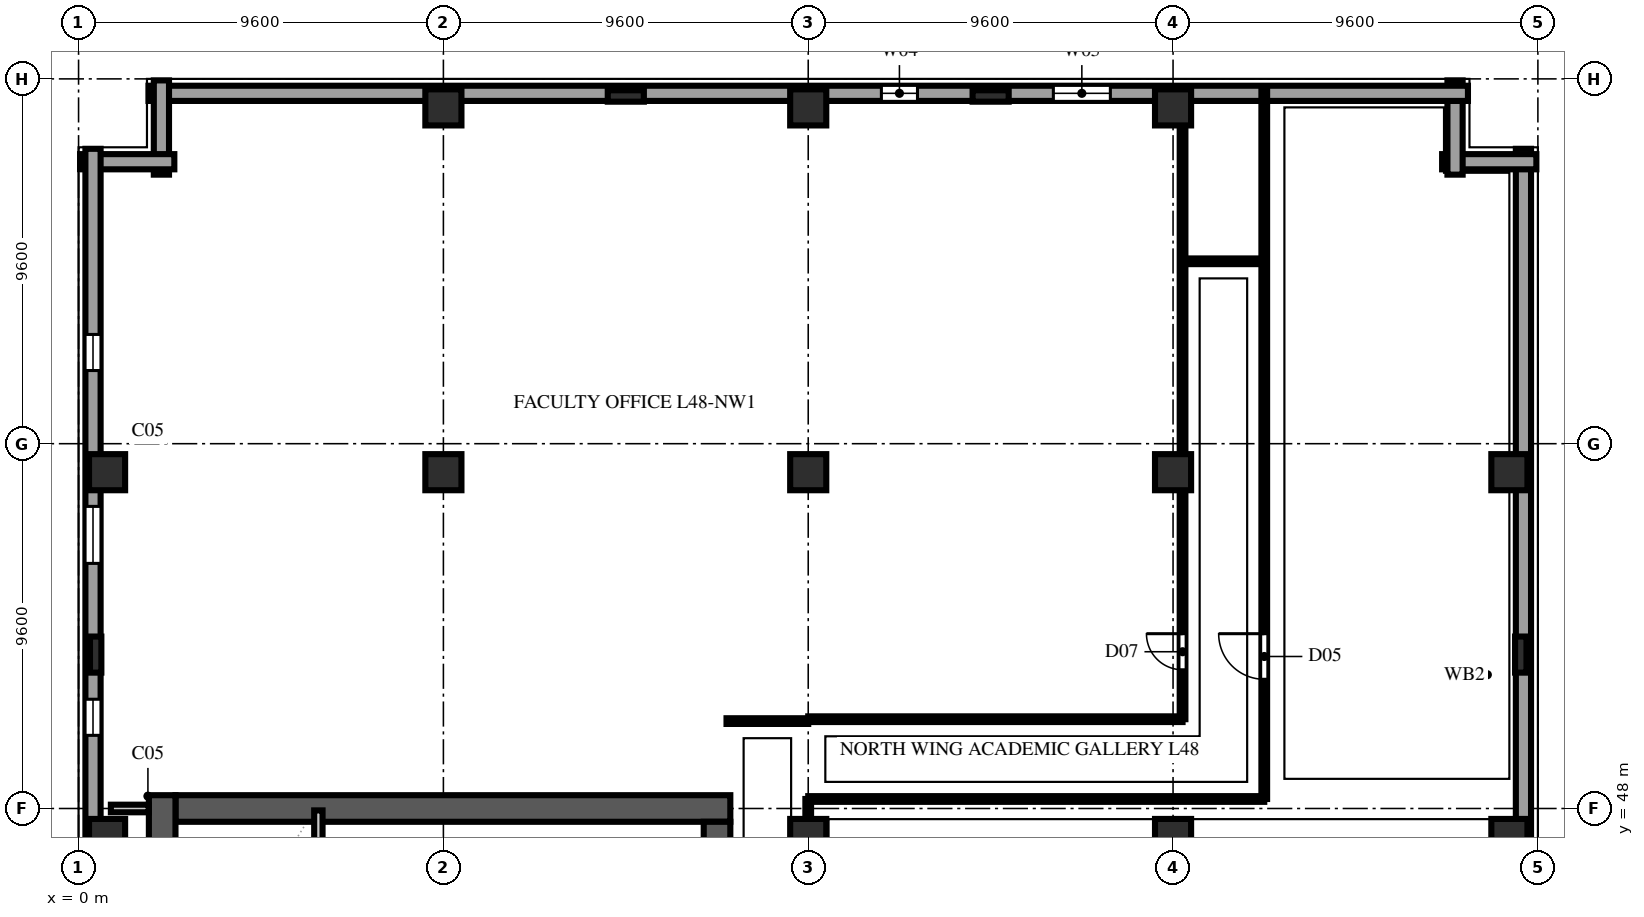
"""IFC4 building model, lengths in metres.
Left out: names, types, materials, properties, quantities, classifications, styles, units other than length and angle.
Written with IfcOpenShell. Run it as: python <this file> out.ifc"""

import sys

from ifc_helpers import new_model, si_unit, direction, frame, frame_2d, origin, origin_2d, place, context, subcontext, project, spatial, rectangle, extrude, element, fill, save


model = new_model("IFC4")
c1 = context("Model", 3, precision=1e-05, world=origin(), true_north=direction((0.0, 1.0)))
c2 = subcontext(c1, "Body", "Model", "MODEL_VIEW")
j1 = project(units=[si_unit("LENGTHUNIT", "METRE"), si_unit("PLANEANGLEUNIT", "RADIAN")], contexts=[c1])
p1 = place(None, origin())
s1 = spatial("IfcSite", under=j1, at=p1, CompositionType="ELEMENT")
p2 = place(p1, origin())
s2 = spatial("IfcBuilding", under=s1, at=p2, CompositionType="ELEMENT")
p3 = place(p2, frame((0.0, 0.0, 190.2)))
s3 = spatial("IfcBuildingStorey", under=s2, at=p3, CompositionType="ELEMENT", Elevation=190.2)
p4 = place(p3, frame((2.55, 48.0, 0.0), z_axis=(0.0, 0.0, 1.0), x_axis=(1.0, 0.0, 0.0)))
e1 = element("IfcWall", 1, at=p4, inside=s3, PredefinedType="SHEAR", context=c2, shape_type="SweptSolid", body=[
    extrude(rectangle(XDim=14.6, YDim=0.7, at=frame_2d((7.3, 0.0))), origin(), (0.0, 0.0, 1.0), 3.48),
])
p5 = place(p3, frame((2.2, 9.25, 0.0), z_axis=(0.0, 0.0, 1.0), x_axis=(0.0, 1.0, 0.0)))
e2 = element("IfcWall", 2, at=p5, inside=s3, PredefinedType="SHEAR", context=c2, shape_type="SweptSolid", body=[
    extrude(rectangle(XDim=39.1, YDim=0.7, at=frame_2d((19.55, 0.0))), origin(), (0.0, 0.0, 1.0), 3.48),
])
p6 = place(p3, frame((16.8, 36.4, 0.0), z_axis=(0.0, 0.0, 1.0), x_axis=(0.0, 1.0, 0.0)))
e3 = element("IfcWall", 3, at=p6, inside=s3, PredefinedType="SHEAR", context=c2, shape_type="SweptSolid", body=[
    extrude(rectangle(XDim=11.25, YDim=0.7, at=frame_2d((5.625, 0.0))), origin(), (0.0, 0.0, 1.0), 3.48),
])
p7 = place(p6, frame((9.2, 0.0, 0.0)))
e4 = element("IfcOpeningElement", 4, at=p7, cuts=e3, PredefinedType="OPENING", context=c2, shape_type="SweptSolid", body=[
    extrude(rectangle(XDim=0.95, YDim=2.15, at=frame_2d((0.475, 1.075))), frame((0.0, 0.362, 0.0), z_axis=(0.0, -1.0, 0.0), x_axis=(1.0, 0.0, 0.0)), (0.0, 0.0, 1.0), 0.724),
])
for number, where, z_axis, x_axis in (
    (5, (0.75, 47.25, 0.0), (0.0, 0.0, 1.0), (1.0, 0.0, 0.0)),
    (6, (0.75, 56.85, 0.0), (0.0, 0.0, 1.0), (1.0, 0.0, 0.0)),
    (7, (9.6, 56.85, 0.0), (0.0, 0.0, 1.0), (1.0, 0.0, 0.0)),
    (8, (9.6, 66.45, 0.0), (0.0, 0.0, 1.0), (1.0, 0.0, 0.0)),
    (9, (19.2, 47.25, 0.0), (0.0, 0.0, 1.0), (1.0, 0.0, 0.0)),
    (10, (19.2, 56.85, 0.0), (0.0, 0.0, 1.0), (1.0, 0.0, 0.0)),
    (11, (19.2, 66.45, 0.0), (0.0, 0.0, 1.0), (1.0, 0.0, 0.0)),
    (12, (28.8, 47.25, 0.0), (0.0, 0.0, 1.0), (1.0, 0.0, 0.0)),
    (13, (28.8, 56.85, 0.0), (0.0, 0.0, 1.0), (1.0, 0.0, 0.0)),
    (14, (28.8, 66.45, 0.0), (0.0, 0.0, 1.0), (1.0, 0.0, 0.0)),
    (15, (37.65, 47.25, 0.0), (0.0, 0.0, 1.0), (1.0, 0.0, 0.0)),
    (16, (37.65, 56.85, 0.0), (0.0, 0.0, 1.0), (1.0, 0.0, 0.0)),
):
    element("IfcColumn", number, at=place(p3, frame(where, z_axis=z_axis, x_axis=x_axis)), inside=s3, PredefinedType="COLUMN", context=c2, shape_type="SweptSolid", body=[
        extrude(rectangle(XDim=0.95, YDim=0.95, at=origin_2d()), origin(), (0.0, 0.0, 1.0), 3.8),
    ])
for number, where, z_axis, x_axis in (
    (17, (0.45, 52.05, 0.0), (0.0, 0.0, 1.0), (0.0, 1.0, 0.0)),
    (18, (14.4, 66.75, 0.0), (0.0, 0.0, 1.0), (1.0, 0.0, 0.0)),
    (19, (24.0, 66.75, 0.0), (0.0, 0.0, 1.0), (1.0, 0.0, 0.0)),
    (20, (37.95, 52.05, 0.0), (0.0, 0.0, 1.0), (0.0, 1.0, 0.0)),
):
    element("IfcColumn", number, at=place(p3, frame(where, z_axis=z_axis, x_axis=x_axis)), inside=s3, PredefinedType="PILASTER", context=c2, shape_type="SweptSolid", body=[
        extrude(rectangle(XDim=0.95, YDim=0.3, at=origin_2d()), origin(), (0.0, 0.0, 1.0), 3.8),
    ])
p8 = place(p3, frame((38.02, 37.68, 0.0), z_axis=(0.0, 0.0, 1.0), x_axis=(0.0, 1.0, 0.0)))
e21 = element("IfcWall", 21, at=p8, inside=s3, PredefinedType="SOLIDWALL", context=c2, shape_type="SweptSolid", body=[
    extrude(rectangle(XDim=27.68, YDim=0.4, at=frame_2d((13.84, 0.0))), origin(), (0.0, 0.0, 1.0), 3.48),
])
p9 = place(p3, frame((38.36, 65.02, 0.0), z_axis=(0.0, 0.0, 1.0), x_axis=(-1.0, 0.0, 0.0)))
e22 = element("IfcWall", 22, at=p9, inside=s3, PredefinedType="SOLIDWALL", context=c2, shape_type="SweptSolid", body=[
    extrude(rectangle(XDim=2.48, YDim=0.4, at=frame_2d((1.24, 0.0))), origin(), (0.0, 0.0, 1.0), 3.48),
])
p10 = place(p3, frame((36.22, 64.68, 0.0), z_axis=(0.0, 0.0, 1.0), x_axis=(0.0, 1.0, 0.0)))
e23 = element("IfcWall", 23, at=p10, inside=s3, PredefinedType="SOLIDWALL", context=c2, shape_type="SweptSolid", body=[
    extrude(rectangle(XDim=2.48, YDim=0.4, at=frame_2d((1.24, 0.0))), origin(), (0.0, 0.0, 1.0), 3.48),
])
p11 = place(p3, frame((36.56, 66.82, 0.0), z_axis=(0.0, 0.0, 1.0), x_axis=(-1.0, 0.0, 0.0)))
e24 = element("IfcWall", 24, at=p11, inside=s3, PredefinedType="SOLIDWALL", context=c2, shape_type="SweptSolid", body=[
    extrude(rectangle(XDim=34.72, YDim=0.4, at=frame_2d((17.36, 0.0))), origin(), (0.0, 0.0, 1.0), 3.48),
])
p12 = place(p11, frame((9.41, 0.0, 0.85)))
e25 = element("IfcOpeningElement", 25, at=p12, cuts=e24, PredefinedType="OPENING", context=c2, shape_type="SweptSolid", body=[
    extrude(rectangle(XDim=1.5, YDim=1.85, at=frame_2d((0.75, 0.925))), frame((0.0, 0.212, 0.0), z_axis=(0.0, -1.0, 0.0), x_axis=(1.0, 0.0, 0.0)), (0.0, 0.0, 1.0), 0.424),
])
p13 = place(p11, frame((14.485, 0.0, 0.85)))
e26 = element("IfcOpeningElement", 26, at=p13, cuts=e24, PredefinedType="OPENING", context=c2, shape_type="SweptSolid", body=[
    extrude(rectangle(XDim=0.95, YDim=1.85, at=frame_2d((0.475, 0.925))), frame((0.0, 0.212, 0.0), z_axis=(0.0, -1.0, 0.0), x_axis=(1.0, 0.0, 0.0)), (0.0, 0.0, 1.0), 0.424),
])
for number, where, z_axis, x_axis in (
    (27, (2.18, 67.16, 0.0), (0.0, 0.0, 1.0), (0.0, -1.0, 0.0)),
    (28, (2.52, 65.02, 0.0), (0.0, 0.0, 1.0), (-1.0, 0.0, 0.0)),
):
    element("IfcWall", number, at=place(p3, frame(where, z_axis=z_axis, x_axis=x_axis)), inside=s3, PredefinedType="SOLIDWALL", context=c2, shape_type="SweptSolid", body=[
        extrude(rectangle(XDim=2.48, YDim=0.4, at=frame_2d((1.24, 0.0))), origin(), (0.0, 0.0, 1.0), 3.48),
    ])
p14 = place(p3, frame((0.38, 65.36, 0.0), z_axis=(0.0, 0.0, 1.0), x_axis=(0.0, -1.0, 0.0)))
e29 = element("IfcWall", 29, at=p14, inside=s3, PredefinedType="SOLIDWALL", context=c2, shape_type="SweptSolid", body=[
    extrude(rectangle(XDim=63.52, YDim=0.4, at=frame_2d((31.76, 0.0))), origin(), (0.0, 0.0, 1.0), 3.48),
])
p15 = place(p14, frame((4.885, 0.0, 0.85)))
e30 = element("IfcOpeningElement", 30, at=p15, cuts=e29, PredefinedType="OPENING", context=c2, shape_type="SweptSolid", body=[
    extrude(rectangle(XDim=0.95, YDim=1.85, at=frame_2d((0.475, 0.925))), frame((0.0, 0.212, 0.0), z_axis=(0.0, -1.0, 0.0), x_axis=(1.0, 0.0, 0.0)), (0.0, 0.0, 1.0), 0.424),
])
p16 = place(p14, frame((9.41, 0.0, 0.85)))
e31 = element("IfcOpeningElement", 31, at=p16, cuts=e29, PredefinedType="OPENING", context=c2, shape_type="SweptSolid", body=[
    extrude(rectangle(XDim=1.5, YDim=1.85, at=frame_2d((0.75, 0.925))), frame((0.0, 0.212, 0.0), z_axis=(0.0, -1.0, 0.0), x_axis=(1.0, 0.0, 0.0)), (0.0, 0.0, 1.0), 0.424),
])
p17 = place(p14, frame((14.485, 0.0, 0.85)))
e32 = element("IfcOpeningElement", 32, at=p17, cuts=e29, PredefinedType="OPENING", context=c2, shape_type="SweptSolid", body=[
    extrude(rectangle(XDim=0.95, YDim=1.85, at=frame_2d((0.475, 0.925))), frame((0.0, 0.212, 0.0), z_axis=(0.0, -1.0, 0.0), x_axis=(1.0, 0.0, 0.0)), (0.0, 0.0, 1.0), 0.424),
])
p18 = place(p14, frame((19.01, 0.0, 0.85)))
e33 = element("IfcOpeningElement", 33, at=p18, cuts=e29, PredefinedType="OPENING", context=c2, shape_type="SweptSolid", body=[
    extrude(rectangle(XDim=1.5, YDim=1.85, at=frame_2d((0.75, 0.925))), frame((0.0, 0.212, 0.0), z_axis=(0.0, -1.0, 0.0), x_axis=(1.0, 0.0, 0.0)), (0.0, 0.0, 1.0), 0.424),
])
p19 = place(p14, frame((24.085, 0.0, 0.85)))
e34 = element("IfcOpeningElement", 34, at=p19, cuts=e29, PredefinedType="OPENING", context=c2, shape_type="SweptSolid", body=[
    extrude(rectangle(XDim=0.95, YDim=1.85, at=frame_2d((0.475, 0.925))), frame((0.0, 0.212, 0.0), z_axis=(0.0, -1.0, 0.0), x_axis=(1.0, 0.0, 0.0)), (0.0, 0.0, 1.0), 0.424),
])
p20 = place(p14, frame((28.61, 0.0, 0.85)))
e35 = element("IfcOpeningElement", 35, at=p20, cuts=e29, PredefinedType="OPENING", context=c2, shape_type="SweptSolid", body=[
    extrude(rectangle(XDim=1.5, YDim=1.85, at=frame_2d((0.75, 0.925))), frame((0.0, 0.212, 0.0), z_axis=(0.0, -1.0, 0.0), x_axis=(1.0, 0.0, 0.0)), (0.0, 0.0, 1.0), 0.424),
])
p21 = place(p14, frame((33.685, 0.0, 0.85)))
e36 = element("IfcOpeningElement", 36, at=p21, cuts=e29, PredefinedType="OPENING", context=c2, shape_type="SweptSolid", body=[
    extrude(rectangle(XDim=0.95, YDim=1.85, at=frame_2d((0.475, 0.925))), frame((0.0, 0.212, 0.0), z_axis=(0.0, -1.0, 0.0), x_axis=(1.0, 0.0, 0.0)), (0.0, 0.0, 1.0), 0.424),
])
p22 = place(p14, frame((38.21, 0.0, 0.85)))
e37 = element("IfcOpeningElement", 37, at=p22, cuts=e29, PredefinedType="OPENING", context=c2, shape_type="SweptSolid", body=[
    extrude(rectangle(XDim=1.5, YDim=1.85, at=frame_2d((0.75, 0.925))), frame((0.0, 0.212, 0.0), z_axis=(0.0, -1.0, 0.0), x_axis=(1.0, 0.0, 0.0)), (0.0, 0.0, 1.0), 0.424),
])
p23 = place(p14, frame((43.285, 0.0, 0.85)))
e38 = element("IfcOpeningElement", 38, at=p23, cuts=e29, PredefinedType="OPENING", context=c2, shape_type="SweptSolid", body=[
    extrude(rectangle(XDim=0.95, YDim=1.85, at=frame_2d((0.475, 0.925))), frame((0.0, 0.212, 0.0), z_axis=(0.0, -1.0, 0.0), x_axis=(1.0, 0.0, 0.0)), (0.0, 0.0, 1.0), 0.424),
])
p24 = place(p14, frame((47.81, 0.0, 0.85)))
e39 = element("IfcOpeningElement", 39, at=p24, cuts=e29, PredefinedType="OPENING", context=c2, shape_type="SweptSolid", body=[
    extrude(rectangle(XDim=1.5, YDim=1.85, at=frame_2d((0.75, 0.925))), frame((0.0, 0.212, 0.0), z_axis=(0.0, -1.0, 0.0), x_axis=(1.0, 0.0, 0.0)), (0.0, 0.0, 1.0), 0.424),
])
p25 = place(p14, frame((52.885, 0.0, 0.85)))
e40 = element("IfcOpeningElement", 40, at=p25, cuts=e29, PredefinedType="OPENING", context=c2, shape_type="SweptSolid", body=[
    extrude(rectangle(XDim=0.95, YDim=1.85, at=frame_2d((0.475, 0.925))), frame((0.0, 0.212, 0.0), z_axis=(0.0, -1.0, 0.0), x_axis=(1.0, 0.0, 0.0)), (0.0, 0.0, 1.0), 0.424),
])
p26 = place(p14, frame((57.41, 0.0, 0.85)))
e41 = element("IfcOpeningElement", 41, at=p26, cuts=e29, PredefinedType="OPENING", context=c2, shape_type="SweptSolid", body=[
    extrude(rectangle(XDim=1.5, YDim=1.85, at=frame_2d((0.75, 0.925))), frame((0.0, 0.212, 0.0), z_axis=(0.0, -1.0, 0.0), x_axis=(1.0, 0.0, 0.0)), (0.0, 0.0, 1.0), 0.424),
])
p27 = place(p3, frame((6.31, 40.14, 0.0), z_axis=(0.0, 0.0, 1.0), x_axis=(0.0, 1.0, 0.0)))
e42 = element("IfcWall", 42, at=p27, inside=s3, PredefinedType="SOLIDWALL", context=c2, shape_type="SweptSolid", body=[
    extrude(rectangle(XDim=7.81, YDim=0.22, at=frame_2d((3.905, 0.0))), origin(), (0.0, 0.0, 1.0), 3.48),
])
p28 = place(p3, frame((0.85, 48.0, 0.0), z_axis=(0.0, 0.0, 1.0), x_axis=(1.0, 0.0, 0.0)))
e43 = element("IfcWall", 43, at=p28, inside=s3, PredefinedType="SOLIDWALL", context=c2, shape_type="SweptSolid", body=[
    extrude(rectangle(XDim=0.995, YDim=0.2, at=frame_2d((0.498, 0.0))), origin(), (0.0, 0.0, 1.0), 3.48),
])
p29 = place(p3, frame((17.05, 50.3, 0.0), z_axis=(0.0, 0.0, 1.0), x_axis=(1.0, 0.0, 0.0)))
e44 = element("IfcWall", 44, at=p29, inside=s3, PredefinedType="PARTITIONING", context=c2, shape_type="SweptSolid", body=[
    extrude(rectangle(XDim=2.15, YDim=0.15, at=frame_2d((1.075, 0.0))), origin(), (0.0, 0.0, 1.0), 3.48),
])
p30 = place(p3, frame((19.2, 38.18, 0.0), z_axis=(0.0, 0.0, 1.0), x_axis=(0.0, 1.0, 0.0)))
e45 = element("IfcWall", 45, at=p30, inside=s3, PredefinedType="PARTITIONING", context=c2, shape_type="SweptSolid", body=[
    extrude(rectangle(XDim=10.07, YDim=0.15, at=frame_2d((5.035, 0.0))), origin(), (0.0, 0.0, 1.0), 2.863),
])
p31 = place(p30, frame((3.6, 0.0, 0.0)))
e46 = element("IfcOpeningElement", 46, at=p31, cuts=e45, PredefinedType="OPENING", context=c2, shape_type="SweptSolid", body=[
    extrude(rectangle(XDim=1.2, YDim=2.2, at=frame_2d((0.6, 1.1))), frame((0.0, 0.087, 0.0), z_axis=(0.0, -1.0, 0.0), x_axis=(1.0, 0.0, 0.0)), (0.0, 0.0, 1.0), 0.174),
])
p32 = place(p3, frame((19.2, 48.25, 0.0), z_axis=(0.0, 0.0, 1.0), x_axis=(1.0, 0.0, 0.0)))
e47 = element("IfcWall", 47, at=p32, inside=s3, PredefinedType="PARTITIONING", context=c2, shape_type="SweptSolid", body=[
    extrude(rectangle(XDim=12.0, YDim=0.15, at=frame_2d((6.0, 0.0))), origin(), (0.0, 0.0, 1.0), 3.48),
])
p33 = place(p3, frame((19.2, 50.35, 0.0), z_axis=(0.0, 0.0, 1.0), x_axis=(1.0, 0.0, 0.0)))
e48 = element("IfcWall", 48, at=p33, inside=s3, PredefinedType="PARTITIONING", context=c2, shape_type="SweptSolid", body=[
    extrude(rectangle(XDim=9.85, YDim=0.15, at=frame_2d((4.925, 0.0))), origin(), (0.0, 0.0, 1.0), 3.48),
])
p34 = place(p3, frame((29.05, 62.4, 0.0), z_axis=(0.0, 0.0, 1.0), x_axis=(1.0, 0.0, 0.0)))
e49 = element("IfcWall", 49, at=p34, inside=s3, PredefinedType="PARTITIONING", context=c2, shape_type="SweptSolid", body=[
    extrude(rectangle(XDim=2.15, YDim=0.15, at=frame_2d((1.075, 0.0))), origin(), (0.0, 0.0, 1.0), 3.48),
])
p35 = place(p3, frame((31.2, 48.25, 0.0), z_axis=(0.0, 0.0, 1.0), x_axis=(0.0, 1.0, 0.0)))
e50 = element("IfcWall", 50, at=p35, inside=s3, PredefinedType="PARTITIONING", context=c2, shape_type="SweptSolid", body=[
    extrude(rectangle(XDim=18.73, YDim=0.15, at=frame_2d((9.365, 0.0))), origin(), (0.0, 0.0, 1.0), 3.48),
])
p36 = place(p35, frame((3.15, 0.0, 0.0)))
e51 = element("IfcOpeningElement", 51, at=p36, cuts=e50, PredefinedType="OPENING", context=c2, shape_type="SweptSolid", body=[
    extrude(rectangle(XDim=1.2, YDim=2.2, at=frame_2d((0.6, 1.1))), frame((0.0, 0.087, 0.0), z_axis=(0.0, -1.0, 0.0), x_axis=(1.0, 0.0, 0.0)), (0.0, 0.0, 1.0), 0.174),
])
p37 = place(p3, frame((29.05, 50.35, 0.0), z_axis=(0.0, 0.0, 1.0), x_axis=(0.0, 1.0, 0.0)))
e52 = element("IfcWall", 52, at=p37, inside=s3, PredefinedType="PARTITIONING", context=c2, shape_type="SweptSolid", body=[
    extrude(rectangle(XDim=16.63, YDim=0.15, at=frame_2d((8.315, 0.0))), origin(), (0.0, 0.0, 1.0), 3.48),
])
p38 = place(p37, frame((1.3, 0.0, 0.0)))
e53 = element("IfcOpeningElement", 53, at=p38, cuts=e52, PredefinedType="OPENING", context=c2, shape_type="SweptSolid", body=[
    extrude(rectangle(XDim=0.95, YDim=2.15, at=frame_2d((0.475, 1.075))), frame((0.0, 0.087, 0.0), z_axis=(0.0, -1.0, 0.0), x_axis=(1.0, 0.0, 0.0)), (0.0, 0.0, 1.0), 0.174),
])
p39 = place(p12, origin())
e54 = element("IfcWindow", 54, at=p39, inside=s3, PartitioningType="DOUBLE_PANEL_VERTICAL", PredefinedType="WINDOW", context=c2, shape_type="SweptSolid", body=[
    extrude(rectangle(XDim=1.5, YDim=1.85, at=frame_2d((0.75, 0.925))), frame((0.0, 0.11, 0.0), z_axis=(0.0, -1.0, 0.0), x_axis=(1.0, 0.0, 0.0)), (0.0, 0.0, 1.0), 0.06),
])
fill(e25, e54)
p40 = place(p13, origin())
e55 = element("IfcWindow", 55, at=p40, inside=s3, PartitioningType="SINGLE_PANEL", PredefinedType="WINDOW", context=c2, shape_type="SweptSolid", body=[
    extrude(rectangle(XDim=0.95, YDim=1.85, at=frame_2d((0.475, 0.925))), frame((0.0, 0.11, 0.0), z_axis=(0.0, -1.0, 0.0), x_axis=(1.0, 0.0, 0.0)), (0.0, 0.0, 1.0), 0.06),
])
fill(e26, e55)
p41 = place(p15, origin())
e56 = element("IfcWindow", 56, at=p41, inside=s3, PartitioningType="SINGLE_PANEL", PredefinedType="WINDOW", context=c2, shape_type="SweptSolid", body=[
    extrude(rectangle(XDim=0.95, YDim=1.85, at=frame_2d((0.475, 0.925))), frame((0.0, 0.11, 0.0), z_axis=(0.0, -1.0, 0.0), x_axis=(1.0, 0.0, 0.0)), (0.0, 0.0, 1.0), 0.06),
])
fill(e30, e56)
p42 = place(p16, origin())
e57 = element("IfcWindow", 57, at=p42, inside=s3, PartitioningType="DOUBLE_PANEL_VERTICAL", PredefinedType="WINDOW", context=c2, shape_type="SweptSolid", body=[
    extrude(rectangle(XDim=1.5, YDim=1.85, at=frame_2d((0.75, 0.925))), frame((0.0, 0.11, 0.0), z_axis=(0.0, -1.0, 0.0), x_axis=(1.0, 0.0, 0.0)), (0.0, 0.0, 1.0), 0.06),
])
fill(e31, e57)
p43 = place(p17, origin())
e58 = element("IfcWindow", 58, at=p43, inside=s3, PartitioningType="SINGLE_PANEL", PredefinedType="WINDOW", context=c2, shape_type="SweptSolid", body=[
    extrude(rectangle(XDim=0.95, YDim=1.85, at=frame_2d((0.475, 0.925))), frame((0.0, 0.11, 0.0), z_axis=(0.0, -1.0, 0.0), x_axis=(1.0, 0.0, 0.0)), (0.0, 0.0, 1.0), 0.06),
])
fill(e32, e58)
p44 = place(p36, origin())
e59 = element("IfcDoor", 59, at=p44, inside=s3, OperationType="SINGLE_SWING_RIGHT", PredefinedType="DOOR", context=c2, shape_type="SweptSolid", body=[
    extrude(rectangle(XDim=1.2, YDim=2.2, at=frame_2d((0.6, 1.1))), frame((0.0, 0.025, 0.0), z_axis=(0.0, -1.0, 0.0), x_axis=(1.0, 0.0, 0.0)), (0.0, 0.0, 1.0), 0.05),
])
fill(e51, e59)
p45 = place(p38, origin())
e60 = element("IfcDoor", 60, at=p45, inside=s3, OperationType="SINGLE_SWING_RIGHT", PredefinedType="DOOR", context=c2, shape_type="SweptSolid", body=[
    extrude(rectangle(XDim=0.95, YDim=2.15, at=frame_2d((0.475, 1.075))), frame((0.0, 0.025, 0.0), z_axis=(0.0, -1.0, 0.0), x_axis=(1.0, 0.0, 0.0)), (0.0, 0.0, 1.0), 0.05),
])
fill(e53, e60)
save(model, sys.argv[1])
